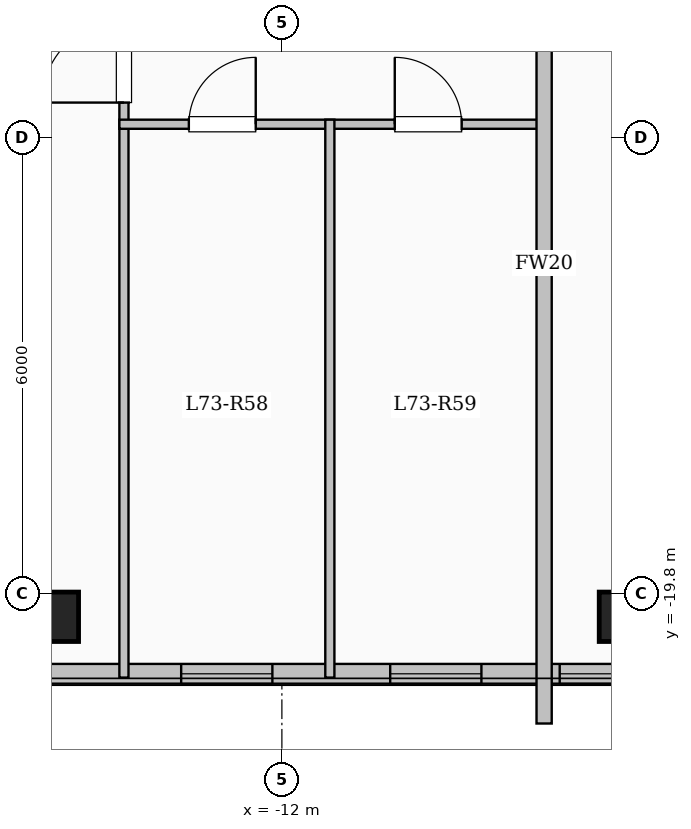
"""IFC4 building model, lengths in metres.
Left out: names, types, materials, properties, quantities, classifications, styles, units other than length and angle.
Written with IfcOpenShell. Run it as: python <this file> out.ifc"""

import sys

from ifc_helpers import new_model, si_unit, direction, frame, frame_2d, origin, origin_2d, place, context, subcontext, project, spatial, rectangle, extrude, element, fill, save


model = new_model("IFC4")
c1 = context("Model", 3, precision=1e-05, world=origin(), true_north=direction((0.0, 1.0)))
c2 = subcontext(c1, "Body", "Model", "MODEL_VIEW")
j1 = project(units=[si_unit("LENGTHUNIT", "METRE"), si_unit("PLANEANGLEUNIT", "RADIAN")], contexts=[c1])
p1 = place(None, origin())
s1 = spatial("IfcSite", under=j1, at=p1, CompositionType="ELEMENT")
p2 = place(p1, origin())
s2 = spatial("IfcBuilding", under=s1, at=p2, CompositionType="ELEMENT")
p3 = place(p2, frame((0.0, 0.0, 268.3)))
s3 = spatial("IfcBuildingStorey", under=s2, at=p3, CompositionType="ELEMENT", Elevation=268.3)
for number, where, z_axis, x_axis in (
    (1, (-15.0, -20.1, 0.0), (0.0, 0.0, 1.0), (1.0, 0.0, 0.0)),
    (2, (-7.5, -20.1, 0.0), (0.0, 0.0, 1.0), (1.0, 0.0, 0.0)),
):
    element("IfcColumn", number, at=place(p3, frame(where, z_axis=z_axis, x_axis=x_axis)), inside=s3, PredefinedType="COLUMN", context=c2, shape_type="SweptSolid", body=[
        extrude(rectangle(XDim=0.65, YDim=0.65, at=origin_2d()), origin(), (0.0, 0.0, 1.0), 3.35),
    ])
p4 = place(p3, frame((-7.35, -20.85, 0.0), z_axis=(0.0, 0.0, 1.0), x_axis=(-1.0, 0.0, 0.0)))
e3 = element("IfcWall", 3, at=p4, inside=s3, PredefinedType="SOLIDWALL", context=c2, shape_type="SweptSolid", body=[
    extrude(rectangle(XDim=10.5, YDim=0.26, at=frame_2d((5.25, 0.0))), origin(), (0.0, 0.0, 1.0), 3.05),
])
p5 = place(p4, frame((0.145, 0.0, 0.95)))
e4 = element("IfcOpeningElement", 4, at=p5, cuts=e3, PredefinedType="OPENING", context=c2, shape_type="SweptSolid", body=[
    extrude(rectangle(XDim=0.85, YDim=1.5, at=frame_2d((0.425, 0.75))), frame((0.0, 0.14, 0.0), z_axis=(0.0, -1.0, 0.0), x_axis=(1.0, 0.0, 0.0)), (0.0, 0.0, 1.0), 0.28),
])
p6 = place(p4, frame((2.025, 0.0, 0.95)))
e5 = element("IfcOpeningElement", 5, at=p6, cuts=e3, PredefinedType="OPENING", context=c2, shape_type="SweptSolid", body=[
    extrude(rectangle(XDim=1.2, YDim=1.5, at=frame_2d((0.6, 0.75))), frame((0.0, 0.14, 0.0), z_axis=(0.0, -1.0, 0.0), x_axis=(1.0, 0.0, 0.0)), (0.0, 0.0, 1.0), 0.28),
])
p7 = place(p4, frame((4.775, 0.0, 0.95)))
e6 = element("IfcOpeningElement", 6, at=p7, cuts=e3, PredefinedType="OPENING", context=c2, shape_type="SweptSolid", body=[
    extrude(rectangle(XDim=1.2, YDim=1.5, at=frame_2d((0.6, 0.75))), frame((0.0, 0.14, 0.0), z_axis=(0.0, -1.0, 0.0), x_axis=(1.0, 0.0, 0.0)), (0.0, 0.0, 1.0), 0.28),
])
p8 = place(p4, frame((7.75, 0.0, 0.9)))
e7 = element("IfcOpeningElement", 7, at=p8, cuts=e3, PredefinedType="OPENING", context=c2, shape_type="SweptSolid", body=[
    extrude(rectangle(XDim=1.65, YDim=1.6, at=frame_2d((0.825, 0.8))), frame((0.0, 0.14, 0.0), z_axis=(0.0, -1.0, 0.0), x_axis=(1.0, 0.0, 0.0)), (0.0, 0.0, 1.0), 0.28),
])
p9 = place(p3, frame((-14.078, -20.9, 0.0), z_axis=(0.0, 0.0, 1.0), x_axis=(0.0, 1.0, 0.0)))
e8 = element("IfcWall", 8, at=p9, inside=s3, PredefinedType="PARTITIONING", context=c2, shape_type="SweptSolid", body=[
    extrude(rectangle(XDim=11.56, YDim=0.12, at=frame_2d((5.78, 0.0))), origin(), (0.0, 0.0, 1.0), 3.05),
])
p10 = place(p9, frame((7.565, 0.0, 0.0)))
e9 = element("IfcOpeningElement", 9, at=p10, cuts=e8, PredefinedType="OPENING", context=c2, shape_type="SweptSolid", body=[
    extrude(rectangle(XDim=1.08, YDim=2.15, at=frame_2d((0.54, 1.075))), frame((0.0, 0.07, 0.0), z_axis=(0.0, -1.0, 0.0), x_axis=(1.0, 0.0, 0.0)), (0.0, 0.0, 1.0), 0.14),
])
p11 = place(p3, frame((-14.138, -13.62, 0.0), z_axis=(0.0, 0.0, 1.0), x_axis=(1.0, 0.0, 0.0)))
e10 = element("IfcWall", 10, at=p11, inside=s3, PredefinedType="PARTITIONING", context=c2, shape_type="SweptSolid", body=[
    extrude(rectangle(XDim=5.598, YDim=0.12, at=frame_2d((2.799, 0.0))), origin(), (0.0, 0.0, 1.0), 3.05),
])
p12 = place(p11, frame((0.914, 0.0, 0.0)))
e11 = element("IfcOpeningElement", 11, at=p12, cuts=e10, PredefinedType="OPENING", context=c2, shape_type="SweptSolid", body=[
    extrude(rectangle(XDim=0.88, YDim=2.1, at=frame_2d((0.44, 1.05))), frame((0.0, 0.07, 0.0), z_axis=(0.0, -1.0, 0.0), x_axis=(1.0, 0.0, 0.0)), (0.0, 0.0, 1.0), 0.14),
])
p13 = place(p11, frame((3.623, 0.0, 0.0)))
e12 = element("IfcOpeningElement", 12, at=p13, cuts=e10, PredefinedType="OPENING", context=c2, shape_type="SweptSolid", body=[
    extrude(rectangle(XDim=0.88, YDim=2.1, at=frame_2d((0.44, 1.05))), frame((0.0, 0.07, 0.0), z_axis=(0.0, -1.0, 0.0), x_axis=(1.0, 0.0, 0.0)), (0.0, 0.0, 1.0), 0.14),
])
p14 = place(p3, frame((-11.369, -20.9, 0.0), z_axis=(0.0, 0.0, 1.0), x_axis=(0.0, 1.0, 0.0)))
e13 = element("IfcWall", 13, at=p14, inside=s3, PredefinedType="PARTITIONING", context=c2, shape_type="SweptSolid", body=[
    extrude(rectangle(XDim=7.34, YDim=0.12, at=frame_2d((3.67, 0.0))), origin(), (0.0, 0.0, 1.0), 3.05),
])
p15 = place(p3, frame((-8.55, -21.504, 0.0), z_axis=(0.0, 0.0, 1.0), x_axis=(0.0, 1.0, 0.0)))
e14 = element("IfcWall", 14, at=p15, inside=s3, PredefinedType="SOLIDWALL", context=c2, shape_type="SweptSolid", body=[
    extrude(rectangle(XDim=12.104, YDim=0.2, at=frame_2d((6.052, 0.0))), origin(), (0.0, 0.0, 1.0), 3.05),
])
p16 = place(p5, origin())
e15 = element("IfcWindow", 15, at=p16, inside=s3, PartitioningType="SINGLE_PANEL", PredefinedType="WINDOW", context=c2, shape_type="SweptSolid", body=[
    extrude(rectangle(XDim=0.85, YDim=1.5, at=frame_2d((0.425, 0.75))), frame((0.0, 0.03, 0.0), z_axis=(0.0, -1.0, 0.0), x_axis=(1.0, 0.0, 0.0)), (0.0, 0.0, 1.0), 0.06),
])
fill(e4, e15)
p17 = place(p6, origin())
e16 = element("IfcWindow", 16, at=p17, inside=s3, PartitioningType="SINGLE_PANEL", PredefinedType="WINDOW", context=c2, shape_type="SweptSolid", body=[
    extrude(rectangle(XDim=1.2, YDim=1.5, at=frame_2d((0.6, 0.75))), frame((0.0, 0.03, 0.0), z_axis=(0.0, -1.0, 0.0), x_axis=(1.0, 0.0, 0.0)), (0.0, 0.0, 1.0), 0.06),
])
fill(e5, e16)
p18 = place(p7, origin())
e17 = element("IfcWindow", 17, at=p18, inside=s3, PartitioningType="SINGLE_PANEL", PredefinedType="WINDOW", context=c2, shape_type="SweptSolid", body=[
    extrude(rectangle(XDim=1.2, YDim=1.5, at=frame_2d((0.6, 0.75))), frame((0.0, 0.03, 0.0), z_axis=(0.0, -1.0, 0.0), x_axis=(1.0, 0.0, 0.0)), (0.0, 0.0, 1.0), 0.06),
])
fill(e6, e17)
p19 = place(p10, origin())
e18 = element("IfcDoor", 18, at=p19, inside=s3, OperationType="SINGLE_SWING_LEFT", PredefinedType="DOOR", context=c2, shape_type="SweptSolid", body=[
    extrude(rectangle(XDim=1.08, YDim=2.15, at=frame_2d((0.54, 1.075))), frame((0.0, 0.025, 0.0), z_axis=(0.0, -1.0, 0.0), x_axis=(1.0, 0.0, 0.0)), (0.0, 0.0, 1.0), 0.05),
])
fill(e9, e18)
p20 = place(p12, origin())
e19 = element("IfcDoor", 19, at=p20, inside=s3, OperationType="SINGLE_SWING_RIGHT", PredefinedType="DOOR", context=c2, shape_type="SweptSolid", body=[
    extrude(rectangle(XDim=0.88, YDim=2.1, at=frame_2d((0.44, 1.05))), frame((0.0, 0.025, 0.0), z_axis=(0.0, -1.0, 0.0), x_axis=(1.0, 0.0, 0.0)), (0.0, 0.0, 1.0), 0.05),
])
fill(e11, e19)
p21 = place(p13, origin())
e20 = element("IfcDoor", 20, at=p21, inside=s3, OperationType="SINGLE_SWING_LEFT", PredefinedType="DOOR", context=c2, shape_type="SweptSolid", body=[
    extrude(rectangle(XDim=0.88, YDim=2.1, at=frame_2d((0.44, 1.05))), frame((0.0, 0.025, 0.0), z_axis=(0.0, -1.0, 0.0), x_axis=(1.0, 0.0, 0.0)), (0.0, 0.0, 1.0), 0.05),
])
fill(e12, e20)
save(model, sys.argv[1])
